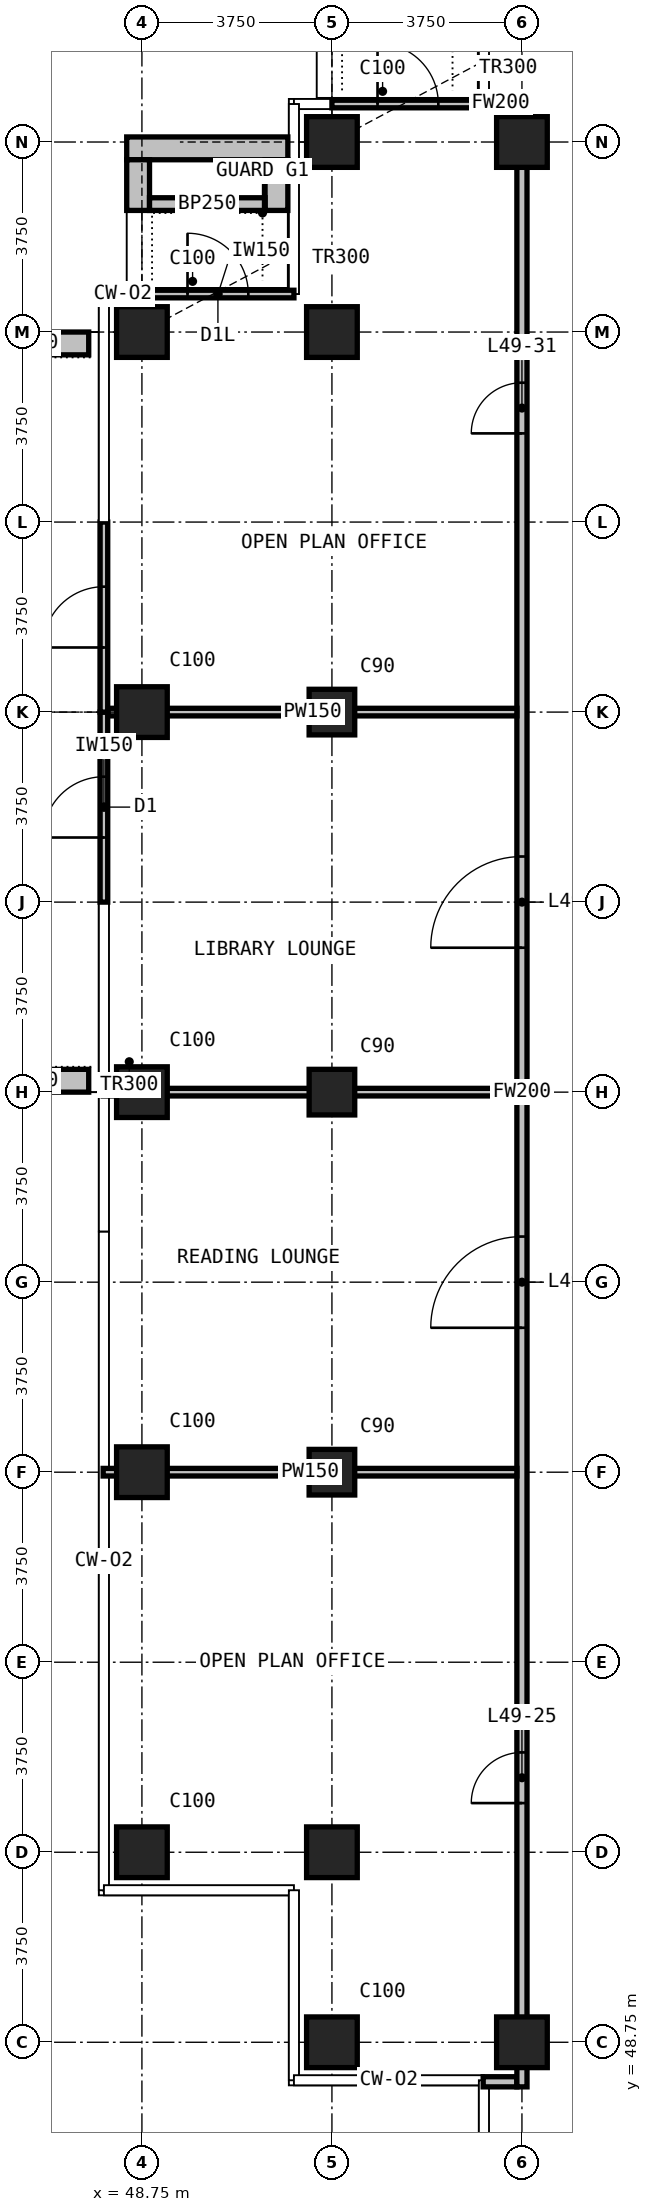
"""IFC4 building model, lengths in metres.
Left out: names, types, materials, properties, quantities, classifications, styles, units other than length and angle.
Written with IfcOpenShell. Run it as: python <this file> out.ifc"""

import sys

from ifc_helpers import new_model, si_unit, direction, frame, frame_2d, origin, origin_2d, place, context, subcontext, project, spatial, rectangle, extrude, element, fill, save


model = new_model("IFC4")
c1 = context("Model", 3, precision=1e-05, world=origin(), true_north=direction((0.0, 1.0)))
c2 = subcontext(c1, "Body", "Model", "MODEL_VIEW")
j1 = project(units=[si_unit("LENGTHUNIT", "METRE"), si_unit("PLANEANGLEUNIT", "RADIAN")], contexts=[c1])
p1 = place(None, origin())
s1 = spatial("IfcSite", under=j1, at=p1, CompositionType="ELEMENT")
p2 = place(p1, origin())
s2 = spatial("IfcBuilding", under=s1, at=p2, CompositionType="ELEMENT")
p3 = place(p2, frame((0.0, 0.0, 192.3)))
s3 = spatial("IfcBuildingStorey", under=s2, at=p3, CompositionType="ELEMENT", Elevation=192.3)
for number, where, z_axis, x_axis in (
    (1, (48.75, 52.5, 0.0), (0.0, 0.0, 1.0), (1.0, 0.0, 0.0)),
    (2, (48.75, 60.0, 0.0), (0.0, 0.0, 1.0), (1.0, 0.0, 0.0)),
    (3, (48.75, 67.5, 0.0), (0.0, 0.0, 1.0), (1.0, 0.0, 0.0)),
    (4, (48.75, 75.0, 0.0), (0.0, 0.0, 1.0), (1.0, 0.0, 0.0)),
    (5, (48.75, 82.5, 0.0), (0.0, 0.0, 1.0), (1.0, 0.0, 0.0)),
    (6, (52.5, 48.75, 0.0), (0.0, 0.0, 1.0), (1.0, 0.0, 0.0)),
    (7, (52.5, 52.5, 0.0), (0.0, 0.0, 1.0), (1.0, 0.0, 0.0)),
):
    element("IfcColumn", number, at=place(p3, frame(where, z_axis=z_axis, x_axis=x_axis)), inside=s3, PredefinedType="COLUMN", context=c2, shape_type="SweptSolid", body=[
        extrude(rectangle(XDim=1.0, YDim=1.0, at=origin_2d()), origin(), (0.0, 0.0, 1.0), 3.6),
    ])
for number, where, z_axis, x_axis in (
    (8, (52.5, 60.0, 0.0), (0.0, 0.0, 1.0), (1.0, 0.0, 0.0)),
    (9, (52.5, 67.5, 0.0), (0.0, 0.0, 1.0), (1.0, 0.0, 0.0)),
    (10, (52.5, 75.0, 0.0), (0.0, 0.0, 1.0), (1.0, 0.0, 0.0)),
):
    element("IfcColumn", number, at=place(p3, frame(where, z_axis=z_axis, x_axis=x_axis)), inside=s3, PredefinedType="COLUMN", context=c2, shape_type="SweptSolid", body=[
        extrude(rectangle(XDim=0.9, YDim=0.9, at=origin_2d()), origin(), (0.0, 0.0, 1.0), 3.6),
    ])
for number, where, z_axis, x_axis in (
    (11, (52.5, 82.5, 0.0), (0.0, 0.0, 1.0), (1.0, 0.0, 0.0)),
    (12, (52.5, 86.25, 0.0), (0.0, 0.0, 1.0), (1.0, 0.0, 0.0)),
    (13, (56.25, 48.75, 0.0), (0.0, 0.0, 1.0), (1.0, 0.0, 0.0)),
    (14, (56.25, 86.25, 0.0), (0.0, 0.0, 1.0), (1.0, 0.0, 0.0)),
):
    element("IfcColumn", number, at=place(p3, frame(where, z_axis=z_axis, x_axis=x_axis)), inside=s3, PredefinedType="COLUMN", context=c2, shape_type="SweptSolid", body=[
        extrude(rectangle(XDim=1.0, YDim=1.0, at=origin_2d()), origin(), (0.0, 0.0, 1.0), 3.6),
    ])
p4 = place(p3, frame((52.5, 87.0, 0.0), z_axis=(0.0, 0.0, 1.0), x_axis=(1.0, 0.0, 0.0)))
e15 = element("IfcWall", 15, at=p4, inside=s3, PredefinedType="SOLIDWALL", context=c2, shape_type="SweptSolid", body=[
    extrude(rectangle(XDim=3.0, YDim=0.15, at=frame_2d((1.5, 0.0))), origin(), (0.0, 0.0, 1.0), 3.3),
])
p5 = place(p4, frame((0.9, 0.0, 0.0)))
e16 = element("IfcOpeningElement", 16, at=p5, cuts=e15, PredefinedType="OPENING", context=c2, shape_type="SweptSolid", body=[
    extrude(rectangle(XDim=1.2, YDim=2.0, at=frame_2d((0.6, 1.0))), frame((0.0, 0.085, 0.0), z_axis=(0.0, -1.0, 0.0), x_axis=(1.0, 0.0, 0.0)), (0.0, 0.0, 1.0), 0.17),
])
p6 = place(p3, frame((48.75, 83.25, 0.0), z_axis=(0.0, 0.0, 1.0), x_axis=(1.0, 0.0, 0.0)))
e17 = element("IfcWall", 17, at=p6, inside=s3, PredefinedType="SOLIDWALL", context=c2, shape_type="SweptSolid", body=[
    extrude(rectangle(XDim=3.0, YDim=0.15, at=frame_2d((1.5, 0.0))), origin(), (0.0, 0.0, 1.0), 3.3),
])
p7 = place(p6, frame((0.9, 0.0, 0.0)))
e18 = element("IfcOpeningElement", 18, at=p7, cuts=e17, PredefinedType="OPENING", context=c2, shape_type="SweptSolid", body=[
    extrude(rectangle(XDim=1.2, YDim=2.0, at=frame_2d((0.6, 1.0))), frame((0.0, 0.085, 0.0), z_axis=(0.0, -1.0, 0.0), x_axis=(1.0, 0.0, 0.0)), (0.0, 0.0, 1.0), 0.17),
])
p8 = place(p3, frame((48.0, 71.25, 0.0), z_axis=(0.0, 0.0, 1.0), x_axis=(0.0, 1.0, 0.0)))
e19 = element("IfcWall", 19, at=p8, inside=s3, PredefinedType="SOLIDWALL", context=c2, shape_type="SweptSolid", body=[
    extrude(rectangle(XDim=3.75, YDim=0.15, at=frame_2d((1.875, 0.0))), origin(), (0.0, 0.0, 1.0), 3.3),
])
p9 = place(p8, frame((1.275, 0.0, 0.0)))
e20 = element("IfcOpeningElement", 20, at=p9, cuts=e19, PredefinedType="OPENING", context=c2, shape_type="SweptSolid", body=[
    extrude(rectangle(XDim=1.2, YDim=2.4, at=frame_2d((0.6, 1.2))), frame((0.0, 0.085, 0.0), z_axis=(0.0, -1.0, 0.0), x_axis=(1.0, 0.0, 0.0)), (0.0, 0.0, 1.0), 0.17),
])
p10 = place(p3, frame((48.0, 75.0, 0.0), z_axis=(0.0, 0.0, 1.0), x_axis=(0.0, 1.0, 0.0)))
e21 = element("IfcWall", 21, at=p10, inside=s3, PredefinedType="SOLIDWALL", context=c2, shape_type="SweptSolid", body=[
    extrude(rectangle(XDim=3.75, YDim=0.15, at=frame_2d((1.875, 0.0))), origin(), (0.0, 0.0, 1.0), 3.3),
])
p11 = place(p10, frame((1.275, 0.0, 0.0)))
e22 = element("IfcOpeningElement", 22, at=p11, cuts=e21, PredefinedType="OPENING", context=c2, shape_type="SweptSolid", body=[
    extrude(rectangle(XDim=1.2, YDim=2.4, at=frame_2d((0.6, 1.2))), frame((0.0, 0.085, 0.0), z_axis=(0.0, -1.0, 0.0), x_axis=(1.0, 0.0, 0.0)), (0.0, 0.0, 1.0), 0.17),
])
p12 = place(p3, frame((48.45, 86.125, 0.0), z_axis=(0.0, 0.0, 1.0), x_axis=(1.0, 0.0, 0.0)))
e23 = element("IfcWall", 23, at=p12, inside=s3, PredefinedType="USERDEFINED", context=c2, shape_type="SweptSolid", body=[
    extrude(rectangle(XDim=3.18, YDim=0.45, at=frame_2d((1.59, 0.0))), origin(), (0.0, 0.0, 1.0), 1.1),
])
for number, where, z_axis, x_axis in (
    (24, (48.675, 84.9, 0.0), (0.0, 0.0, 1.0), (0.0, 1.0, 0.0)),
    (25, (51.405, 84.9, 0.0), (0.0, 0.0, 1.0), (0.0, 1.0, 0.0)),
):
    element("IfcWall", number, at=place(p3, frame(where, z_axis=z_axis, x_axis=x_axis)), inside=s3, PredefinedType="USERDEFINED", context=c2, shape_type="SweptSolid", body=[
        extrude(rectangle(XDim=1.0, YDim=0.45, at=frame_2d((0.5, 0.0))), origin(), (0.0, 0.0, 1.0), 1.1),
    ])
p13 = place(p3, frame((48.9, 85.025, 0.0), z_axis=(0.0, 0.0, 1.0), x_axis=(1.0, 0.0, 0.0)))
e26 = element("IfcWall", 26, at=p13, inside=s3, PredefinedType="USERDEFINED", context=c2, shape_type="SweptSolid", body=[
    extrude(rectangle(XDim=2.28, YDim=0.25, at=frame_2d((1.14, 0.0))), origin(), (0.0, 0.0, 1.0), 1.0),
])
for number, where, z_axis, x_axis in (
    (27, (47.7, 67.725, 0.0), (0.0, 0.0, 1.0), (-1.0, 0.0, 0.0)),
    (28, (47.7, 82.275, 0.0), (0.0, 0.0, 1.0), (-1.0, 0.0, 0.0)),
):
    element("IfcWall", number, at=place(p3, frame(where, z_axis=z_axis, x_axis=x_axis)), inside=s3, PredefinedType="USERDEFINED", context=c2, shape_type="SweptSolid", body=[
        extrude(rectangle(XDim=2.35, YDim=0.45, at=frame_2d((1.175, 0.0))), origin(), (0.0, 0.0, 1.0), 1.1),
    ])
p14 = place(p3, frame((55.485, 47.97, 0.0), z_axis=(0.0, 0.0, 1.0), x_axis=(1.0, 0.0, 0.0)))
e29 = element("IfcWall", 29, at=p14, inside=s3, PredefinedType="PARTITIONING", context=c2, shape_type="SweptSolid", body=[
    extrude(rectangle(XDim=0.665, YDim=0.2, at=frame_2d((0.333, 0.0))), origin(), (0.0, 0.0, 1.0), 3.3),
])
p15 = place(p3, frame((55.51, 87.03, 0.0), z_axis=(0.0, 0.0, 1.0), x_axis=(1.0, 0.0, 0.0)))
e30 = element("IfcWall", 30, at=p15, inside=s3, PredefinedType="PARTITIONING", context=c2, shape_type="SweptSolid", body=[
    extrude(rectangle(XDim=0.64, YDim=0.2, at=frame_2d((0.32, 0.0))), origin(), (0.0, 0.0, 1.0), 3.3),
])
p16 = place(p3, frame((56.25, 47.87, 0.0), z_axis=(0.0, 0.0, 1.0), x_axis=(0.0, 1.0, 0.0)))
e31 = element("IfcWall", 31, at=p16, inside=s3, PredefinedType="PARTITIONING", context=c2, shape_type="SweptSolid", body=[
    extrude(rectangle(XDim=39.26, YDim=0.2, at=frame_2d((19.63, 0.0))), origin(), (0.0, 0.0, 1.0), 3.3),
])
p17 = place(p16, frame((5.6, 0.0, 0.0)))
e32 = element("IfcOpeningElement", 32, at=p17, cuts=e31, PredefinedType="OPENING", context=c2, shape_type="SweptSolid", body=[
    extrude(rectangle(XDim=1.0, YDim=2.2, at=frame_2d((0.5, 1.1))), frame((0.0, 0.11, 0.0), z_axis=(0.0, -1.0, 0.0), x_axis=(1.0, 0.0, 0.0)), (0.0, 0.0, 1.0), 0.22),
])
p18 = place(p16, frame((14.98, 0.0, 0.0)))
e33 = element("IfcOpeningElement", 33, at=p18, cuts=e31, PredefinedType="OPENING", context=c2, shape_type="SweptSolid", body=[
    extrude(rectangle(XDim=1.8, YDim=2.2, at=frame_2d((0.9, 1.1))), frame((0.0, 0.11, 0.0), z_axis=(0.0, -1.0, 0.0), x_axis=(1.0, 0.0, 0.0)), (0.0, 0.0, 1.0), 0.22),
])
p19 = place(p16, frame((22.48, 0.0, 0.0)))
e34 = element("IfcOpeningElement", 34, at=p19, cuts=e31, PredefinedType="OPENING", context=c2, shape_type="SweptSolid", body=[
    extrude(rectangle(XDim=1.8, YDim=2.2, at=frame_2d((0.9, 1.1))), frame((0.0, 0.11, 0.0), z_axis=(0.0, -1.0, 0.0), x_axis=(1.0, 0.0, 0.0)), (0.0, 0.0, 1.0), 0.22),
])
p20 = place(p16, frame((32.63, 0.0, 0.0)))
e35 = element("IfcOpeningElement", 35, at=p20, cuts=e31, PredefinedType="OPENING", context=c2, shape_type="SweptSolid", body=[
    extrude(rectangle(XDim=1.0, YDim=2.2, at=frame_2d((0.5, 1.1))), frame((0.0, 0.11, 0.0), z_axis=(0.0, -1.0, 0.0), x_axis=(1.0, 0.0, 0.0)), (0.0, 0.0, 1.0), 0.22),
])
for number, where, z_axis, x_axis in (
    (36, (47.985, 60.0, 0.0), (0.0, 0.0, 1.0), (1.0, 0.0, 0.0)),
    (37, (47.985, 67.5, 0.0), (0.0, 0.0, 1.0), (1.0, 0.0, 0.0)),
):
    element("IfcWall", number, at=place(p3, frame(where, z_axis=z_axis, x_axis=x_axis)), inside=s3, PredefinedType="PARTITIONING", context=c2, shape_type="SweptSolid", body=[
        extrude(rectangle(XDim=8.165, YDim=0.15, at=frame_2d((4.083, 0.0))), origin(), (0.0, 0.0, 1.0), 3.3),
    ])
p21 = place(p3, frame((48.085, 75.0, 0.0), z_axis=(0.0, 0.0, 1.0), x_axis=(1.0, 0.0, 0.0)))
e38 = element("IfcWall", 38, at=p21, inside=s3, PredefinedType="PARTITIONING", context=c2, shape_type="SweptSolid", body=[
    extrude(rectangle(XDim=8.065, YDim=0.15, at=frame_2d((4.032, 0.0))), origin(), (0.0, 0.0, 1.0), 3.3),
])
p22 = place(p5, origin())
e39 = element("IfcDoor", 39, at=p22, inside=s3, OperationType="SINGLE_SWING_LEFT", PredefinedType="DOOR", context=c2, shape_type="SweptSolid", body=[
    extrude(rectangle(XDim=1.2, YDim=2.0, at=frame_2d((0.6, 1.0))), frame((0.0, 0.025, 0.0), z_axis=(0.0, -1.0, 0.0), x_axis=(1.0, 0.0, 0.0)), (0.0, 0.0, 1.0), 0.05),
])
fill(e16, e39)
p23 = place(p7, origin())
e40 = element("IfcDoor", 40, at=p23, inside=s3, OperationType="SINGLE_SWING_LEFT", PredefinedType="DOOR", context=c2, shape_type="SweptSolid", body=[
    extrude(rectangle(XDim=1.2, YDim=2.0, at=frame_2d((0.6, 1.0))), frame((0.0, 0.025, 0.0), z_axis=(0.0, -1.0, 0.0), x_axis=(1.0, 0.0, 0.0)), (0.0, 0.0, 1.0), 0.05),
])
fill(e18, e40)
p24 = place(p9, origin())
e41 = element("IfcDoor", 41, at=p24, inside=s3, OperationType="SINGLE_SWING_LEFT", PredefinedType="DOOR", context=c2, shape_type="SweptSolid", body=[
    extrude(rectangle(XDim=1.2, YDim=2.4, at=frame_2d((0.6, 1.2))), frame((0.0, 0.025, 0.0), z_axis=(0.0, -1.0, 0.0), x_axis=(1.0, 0.0, 0.0)), (0.0, 0.0, 1.0), 0.05),
])
fill(e20, e41)
p25 = place(p11, origin())
e42 = element("IfcDoor", 42, at=p25, inside=s3, OperationType="SINGLE_SWING_LEFT", PredefinedType="DOOR", context=c2, shape_type="SweptSolid", body=[
    extrude(rectangle(XDim=1.2, YDim=2.4, at=frame_2d((0.6, 1.2))), frame((0.0, 0.025, 0.0), z_axis=(0.0, -1.0, 0.0), x_axis=(1.0, 0.0, 0.0)), (0.0, 0.0, 1.0), 0.05),
])
fill(e22, e42)
p26 = place(p17, origin())
e43 = element("IfcDoor", 43, at=p26, inside=s3, OperationType="SINGLE_SWING_RIGHT", PredefinedType="DOOR", context=c2, shape_type="SweptSolid", body=[
    extrude(rectangle(XDim=1.0, YDim=2.2, at=frame_2d((0.5, 1.1))), frame((0.0, 0.025, 0.0), z_axis=(0.0, -1.0, 0.0), x_axis=(1.0, 0.0, 0.0)), (0.0, 0.0, 1.0), 0.05),
])
fill(e32, e43)
p27 = place(p18, origin())
e44 = element("IfcDoor", 44, at=p27, inside=s3, OperationType="DOUBLE_DOOR_SINGLE_SWING", PredefinedType="DOOR", context=c2, shape_type="SweptSolid", body=[
    extrude(rectangle(XDim=1.8, YDim=2.2, at=frame_2d((0.9, 1.1))), frame((0.0, 0.025, 0.0), z_axis=(0.0, -1.0, 0.0), x_axis=(1.0, 0.0, 0.0)), (0.0, 0.0, 1.0), 0.05),
])
fill(e33, e44)
p28 = place(p19, origin())
e45 = element("IfcDoor", 45, at=p28, inside=s3, OperationType="DOUBLE_DOOR_SINGLE_SWING", PredefinedType="DOOR", context=c2, shape_type="SweptSolid", body=[
    extrude(rectangle(XDim=1.8, YDim=2.2, at=frame_2d((0.9, 1.1))), frame((0.0, 0.025, 0.0), z_axis=(0.0, -1.0, 0.0), x_axis=(1.0, 0.0, 0.0)), (0.0, 0.0, 1.0), 0.05),
])
fill(e34, e45)
p29 = place(p20, origin())
e46 = element("IfcDoor", 46, at=p29, inside=s3, OperationType="SINGLE_SWING_RIGHT", PredefinedType="DOOR", context=c2, shape_type="SweptSolid", body=[
    extrude(rectangle(XDim=1.0, YDim=2.2, at=frame_2d((0.5, 1.1))), frame((0.0, 0.025, 0.0), z_axis=(0.0, -1.0, 0.0), x_axis=(1.0, 0.0, 0.0)), (0.0, 0.0, 1.0), 0.05),
])
fill(e35, e46)
save(model, sys.argv[1])
